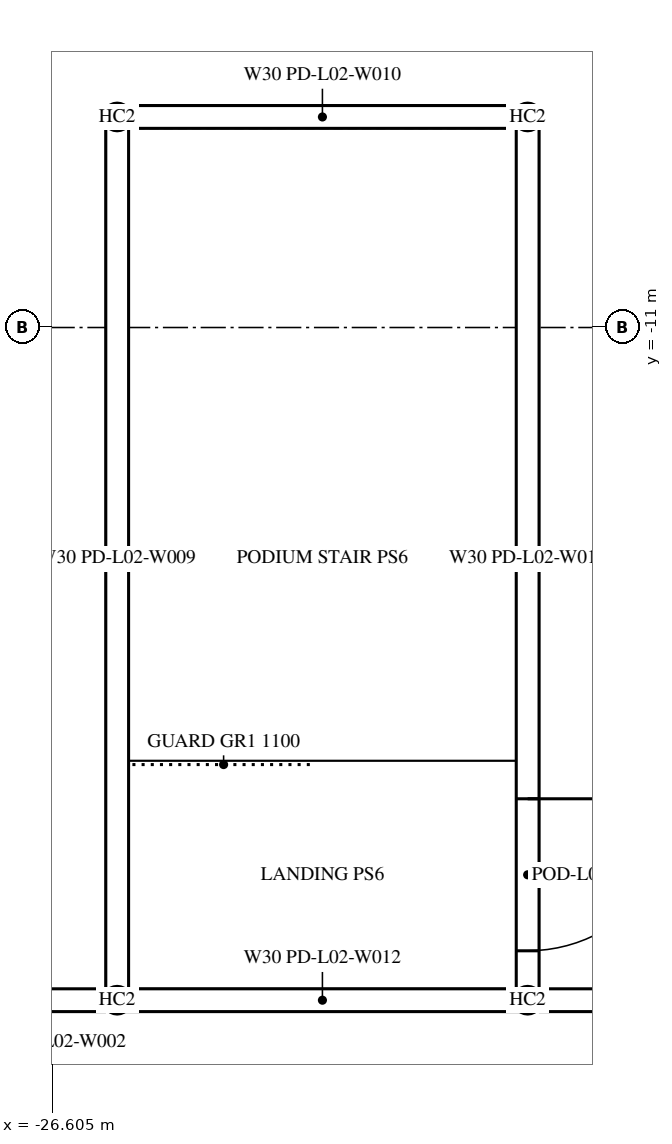
"""IFC4 building model, lengths in metres.
Left out: names, types, materials, properties, quantities, classifications, styles, units other than length and angle.
Written with IfcOpenShell. Run it as: python <this file> out.ifc"""

import sys

from ifc_helpers import new_model, si_unit, direction, frame, frame_2d, origin, origin_2d, place, context, subcontext, project, spatial, rectangle, hollow_circle, extrude, element, fill, save


model = new_model("IFC4")
c1 = context("Model", 3, precision=1e-05, world=origin(), true_north=direction((0.0, 1.0)))
c2 = subcontext(c1, "Body", "Model", "MODEL_VIEW")
j1 = project(units=[si_unit("LENGTHUNIT", "METRE"), si_unit("PLANEANGLEUNIT", "RADIAN")], contexts=[c1])
p1 = place(None, origin())
s1 = spatial("IfcSite", under=j1, at=p1, CompositionType="ELEMENT")
p2 = place(p1, origin())
s2 = spatial("IfcBuilding", under=s1, at=p2, CompositionType="ELEMENT")
p3 = place(p2, frame((0.0, 0.0, 12.6)))
s3 = spatial("IfcBuildingStorey", under=s2, at=p3, CompositionType="ELEMENT", Elevation=12.6)
p4 = place(p3, frame((-27.45, -19.85, 0.0), z_axis=(0.0, 0.0, 1.0), x_axis=(1.0, 0.0, 0.0)))
e1 = element("IfcWall", 1, at=p4, inside=s3, PredefinedType="PARAPET", context=c2, shape_type="SweptSolid", body=[
    extrude(rectangle(XDim=1.55, YDim=0.3, at=frame_2d((0.775, 0.0))), origin(), (0.0, 0.0, 1.0), 1.1),
])
p5 = place(p3, frame((-20.2, -19.85, 0.0), z_axis=(0.0, 0.0, 1.0), x_axis=(1.0, 0.0, 0.0)))
e2 = element("IfcWall", 2, at=p5, inside=s3, PredefinedType="PARAPET", context=c2, shape_type="SweptSolid", body=[
    extrude(rectangle(XDim=40.4, YDim=0.3, at=frame_2d((20.2, 0.0))), origin(), (0.0, 0.0, 1.0), 1.1),
])
for number, where, z_axis, x_axis in (
    (3, (-25.75, -8.23, 0.0), (0.0, 0.0, 1.0), (1.0, 0.0, 0.0)),
    (4, (-20.35, -8.23, 0.0), (0.0, 0.0, 1.0), (1.0, 0.0, 0.0)),
    (5, (-25.75, -19.85, 0.0), (0.0, 0.0, 1.0), (1.0, 0.0, 0.0)),
    (6, (-20.35, -19.85, 0.0), (0.0, 0.0, 1.0), (1.0, 0.0, 0.0)),
):
    element("IfcColumn", number, at=place(p3, frame(where, z_axis=z_axis, x_axis=x_axis)), inside=s3, PredefinedType="COLUMN", context=c2, shape_type="SweptSolid", body=[
        extrude(hollow_circle(Radius=0.162, WallThickness=0.012, at=origin_2d()), origin(), (0.0, 0.0, 1.0), 3.0),
    ])
for number, where, z_axis, x_axis in (
    (7, (-25.689, -19.85, 0.0), (0.0, 0.0, 1.0), (1.0, 0.0, 0.0)),
    (8, (-25.689, -8.23, 0.0), (0.0, 0.0, 1.0), (1.0, 0.0, 0.0)),
):
    element("IfcWall", number, at=place(p3, frame(where, z_axis=z_axis, x_axis=x_axis)), inside=s3, PredefinedType="SOLIDWALL", context=c2, shape_type="SweptSolid", body=[
        extrude(rectangle(XDim=5.278, YDim=0.3, at=frame_2d((2.639, 0.0))), origin(), (0.0, 0.0, 1.0), 2.23),
    ])
p6 = place(p3, frame((-20.35, -8.291, 0.0), z_axis=(0.0, 0.0, 1.0), x_axis=(0.0, -1.0, 0.0)))
e9 = element("IfcWall", 9, at=p6, inside=s3, PredefinedType="SOLIDWALL", context=c2, shape_type="SweptSolid", body=[
    extrude(rectangle(XDim=11.498, YDim=0.3, at=frame_2d((5.749, 0.0))), origin(), (0.0, 0.0, 1.0), 2.23),
])
p7 = place(p6, frame((8.909, 0.0, 0.0)))
e10 = element("IfcOpeningElement", 10, at=p7, cuts=e9, PredefinedType="OPENING", context=c2, shape_type="SweptSolid", body=[
    extrude(rectangle(XDim=2.0, YDim=2.2, at=frame_2d((1.0, 1.1))), frame((0.0, 0.16, 0.0), z_axis=(0.0, -1.0, 0.0), x_axis=(1.0, 0.0, 0.0)), (0.0, 0.0, 1.0), 0.32),
])
p8 = place(p3, frame((-25.75, -8.291, 0.0), z_axis=(0.0, 0.0, 1.0), x_axis=(0.0, -1.0, 0.0)))
e11 = element("IfcWall", 11, at=p8, inside=s3, PredefinedType="SOLIDWALL", context=c2, shape_type="SweptSolid", body=[
    extrude(rectangle(XDim=11.498, YDim=0.3, at=frame_2d((5.749, 0.0))), origin(), (0.0, 0.0, 1.0), 2.23),
])
p9 = place(p7, origin())
e12 = element("IfcDoor", 12, at=p9, inside=s3, OperationType="DOUBLE_DOOR_SINGLE_SWING", PredefinedType="DOOR", context=c2, shape_type="SweptSolid", body=[
    extrude(rectangle(XDim=2.0, YDim=2.2, at=frame_2d((1.0, 1.1))), frame((0.0, 0.025, 0.0), z_axis=(0.0, -1.0, 0.0), x_axis=(1.0, 0.0, 0.0)), (0.0, 0.0, 1.0), 0.05),
])
fill(e10, e12)
save(model, sys.argv[1])
